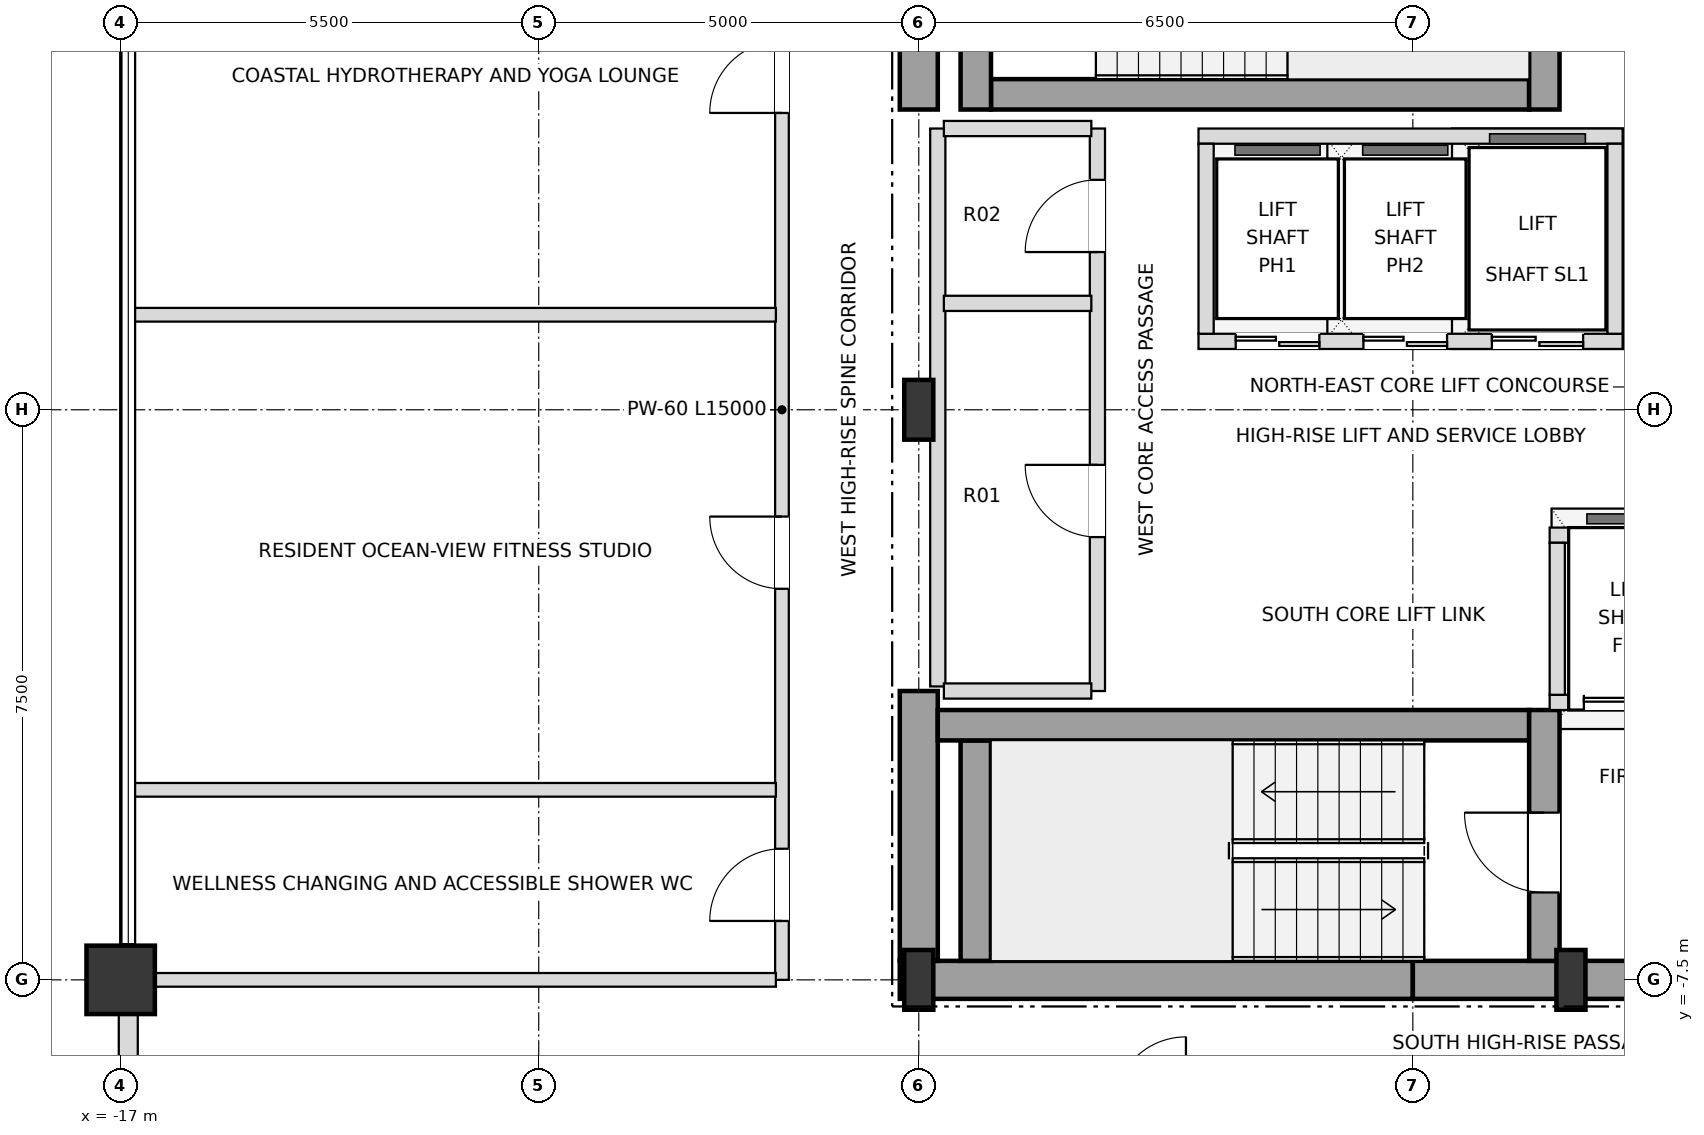
"""IFC4 building model, lengths in metres.
Left out: names, types, materials, properties, quantities, classifications, styles, units other than length and angle.
Written with IfcOpenShell. Run it as: python <this file> out.ifc"""

import sys

from ifc_helpers import new_model, si_unit, direction, frame, frame_2d, origin, origin_2d, place, context, subcontext, project, spatial, rectangle, i_section, extrude, element, fill, save


model = new_model("IFC4")
c1 = context("Model", 3, precision=1e-05, world=origin(), true_north=direction((0.0, 1.0)))
c2 = subcontext(c1, "Body", "Model", "MODEL_VIEW")
j1 = project(units=[si_unit("LENGTHUNIT", "METRE"), si_unit("PLANEANGLEUNIT", "RADIAN")], contexts=[c1])
p1 = place(None, origin())
s1 = spatial("IfcSite", under=j1, at=p1, CompositionType="ELEMENT")
p2 = place(p1, origin())
s2 = spatial("IfcBuilding", under=s1, at=p2, CompositionType="ELEMENT")
p3 = place(p2, frame((0.0, 0.0, 276.3)))
s3 = spatial("IfcBuildingStorey", under=s2, at=p3, CompositionType="ELEMENT", Elevation=276.3)
for number, where, z_axis, x_axis in (
    (1, (-6.5, -7.5, 0.0), (0.0, 0.0, 1.0), (1.0, 0.0, 0.0)),
    (2, (2.08, -7.5, 0.0), (0.0, 0.0, 1.0), (1.0, 0.0, 0.0)),
    (3, (-6.5, 0.0, 0.0), (0.0, 0.0, 1.0), (1.0, 0.0, 0.0)),
):
    element("IfcColumn", number, at=place(p3, frame(where, z_axis=z_axis, x_axis=x_axis)), inside=s3, PredefinedType="COLUMN", context=c2, shape_type="SweptSolid", body=[
        extrude(i_section(OverallWidth=0.382, OverallDepth=0.786, WebThickness=0.02, FlangeThickness=0.033, at=origin_2d()), origin(), (0.0, 0.0, 1.0), 3.6),
    ])
p4 = place(p3, frame((-17.0, -7.5, 0.0), z_axis=(0.0, 0.0, 1.0), x_axis=(1.0, 0.0, 0.0)))
e4 = element("IfcColumn", 4, at=p4, inside=s3, PredefinedType="USERDEFINED", context=c2, shape_type="SweptSolid", body=[
    extrude(rectangle(XDim=0.9, YDim=0.9, at=origin_2d()), origin(), (0.0, 0.0, 1.0), 3.6),
])
p5 = place(p3, frame((-16.9, -7.945, 0.0), z_axis=(0.0, 0.0, 1.0), x_axis=(0.0, -1.0, 0.0)))
e5 = element("IfcWall", 5, at=p5, inside=s3, PredefinedType="SOLIDWALL", context=c2, shape_type="SweptSolid", body=[
    extrude(rectangle(XDim=4.61, YDim=0.25, at=frame_2d((2.305, 0.0))), origin(), (0.0, 0.0, 1.0), 2.748),
])
p6 = place(p5, frame((1.405, 0.0, 0.72)))
e6 = element("IfcOpeningElement", 6, at=p6, cuts=e5, PredefinedType="OPENING", context=c2, shape_type="SweptSolid", body=[
    extrude(rectangle(XDim=1.8, YDim=1.68, at=frame_2d((0.9, 0.84))), frame((0.0, 0.135, 0.0), z_axis=(0.0, -1.0, 0.0), x_axis=(1.0, 0.0, 0.0)), (0.0, 0.0, 1.0), 0.27),
])
for number, where, z_axis, x_axis in (
    (7, (-6.75, -7.5, 0.0), (0.0, 0.0, 1.0), (1.0, 0.0, 0.0)),
    (8, (0.0, -7.5, 0.0), (0.0, 0.0, 1.0), (1.0, 0.0, 0.0)),
):
    element("IfcWall", number, at=place(p3, frame(where, z_axis=z_axis, x_axis=x_axis)), inside=s3, PredefinedType="SHEAR", context=c2, shape_type="SweptSolid", body=[
        extrude(rectangle(XDim=6.75, YDim=0.5, at=frame_2d((3.375, 0.0))), origin(), (0.0, 0.0, 1.0), 3.38),
    ])
p7 = place(p3, frame((-6.5, -7.25, 0.0), z_axis=(0.0, 0.0, 1.0), x_axis=(0.0, 1.0, 0.0)))
e9 = element("IfcWall", 9, at=p7, inside=s3, PredefinedType="SHEAR", context=c2, shape_type="SweptSolid", body=[
    extrude(rectangle(XDim=3.55, YDim=0.5, at=frame_2d((1.775, 0.0))), origin(), (0.0, 0.0, 1.0), 3.38),
])
p8 = place(p3, frame((-6.5, 3.95, 0.0), z_axis=(0.0, 0.0, 1.0), x_axis=(0.0, 1.0, 0.0)))
e10 = element("IfcWall", 10, at=p8, inside=s3, PredefinedType="SHEAR", context=c2, shape_type="SweptSolid", body=[
    extrude(rectangle(XDim=3.3, YDim=0.5, at=frame_2d((1.65, 0.0))), origin(), (0.0, 0.0, 1.0), 3.38),
])
p9 = place(p3, frame((-5.75, -7.25, 0.0), z_axis=(0.0, 0.0, 1.0), x_axis=(0.0, 1.0, 0.0)))
e11 = element("IfcWall", 11, at=p9, inside=s3, PredefinedType="SHEAR", context=c2, shape_type="SweptSolid", body=[
    extrude(rectangle(XDim=2.9, YDim=0.4, at=frame_2d((1.45, 0.0))), origin(), (0.0, 0.0, 1.0), 3.38),
])
p10 = place(p3, frame((-6.25, -4.15, 0.0), z_axis=(0.0, 0.0, 1.0), x_axis=(1.0, 0.0, 0.0)))
e12 = element("IfcWall", 12, at=p10, inside=s3, PredefinedType="SHEAR", context=c2, shape_type="SweptSolid", body=[
    extrude(rectangle(XDim=7.78, YDim=0.4, at=frame_2d((3.89, 0.0))), origin(), (0.0, 0.0, 1.0), 3.38),
])
p11 = place(p3, frame((1.73, -7.25, 0.0), z_axis=(0.0, 0.0, 1.0), x_axis=(0.0, 1.0, 0.0)))
e13 = element("IfcWall", 13, at=p11, inside=s3, PredefinedType="SHEAR", context=c2, shape_type="SweptSolid", body=[
    extrude(rectangle(XDim=3.3, YDim=0.4, at=frame_2d((1.65, 0.0))), origin(), (0.0, 0.0, 1.0), 3.38),
])
p12 = place(p11, frame((0.9, 0.0, 0.0)))
e14 = element("IfcOpeningElement", 14, at=p12, cuts=e13, PredefinedType="OPENING", context=c2, shape_type="SweptSolid", body=[
    extrude(rectangle(XDim=1.05, YDim=2.15, at=frame_2d((0.525, 1.075))), frame((0.0, 0.21, 0.0), z_axis=(0.0, -1.0, 0.0), x_axis=(1.0, 0.0, 0.0)), (0.0, 0.0, 1.0), 0.42),
])
p13 = place(p3, frame((-5.55, 4.15, 0.0), z_axis=(0.0, 0.0, 1.0), x_axis=(1.0, 0.0, 0.0)))
e15 = element("IfcWall", 15, at=p13, inside=s3, PredefinedType="SHEAR", context=c2, shape_type="SweptSolid", body=[
    extrude(rectangle(XDim=7.08, YDim=0.4, at=frame_2d((3.54, 0.0))), origin(), (0.0, 0.0, 1.0), 3.38),
])
for number, where, z_axis, x_axis in (
    (16, (1.73, 3.95, 0.0), (0.0, 0.0, 1.0), (0.0, 1.0, 0.0)),
    (17, (-5.75, 3.95, 0.0), (0.0, 0.0, 1.0), (0.0, 1.0, 0.0)),
):
    element("IfcWall", number, at=place(p3, frame(where, z_axis=z_axis, x_axis=x_axis)), inside=s3, PredefinedType="SHEAR", context=c2, shape_type="SweptSolid", body=[
        extrude(rectangle(XDim=3.3, YDim=0.4, at=frame_2d((1.65, 0.0))), origin(), (0.0, 0.0, 1.0), 3.38),
    ])
p14 = place(p3, frame((-2.82, 0.9, 0.0), z_axis=(0.0, 0.0, 1.0), x_axis=(1.0, 0.0, 0.0)))
e18 = element("IfcWall", 18, at=p14, inside=s3, PredefinedType="SOLIDWALL", context=c2, shape_type="SweptSolid", body=[
    extrude(rectangle(XDim=5.58, YDim=0.2, at=frame_2d((2.79, 0.0))), origin(), (0.0, 0.0, 1.0), 3.38),
])
p15 = place(p14, frame((0.49, 0.0, 0.0)))
e19 = element("IfcOpeningElement", 19, at=p15, cuts=e18, PredefinedType="OPENING", context=c2, shape_type="SweptSolid", body=[
    extrude(rectangle(XDim=1.1, YDim=2.15, at=frame_2d((0.55, 1.075))), frame((0.0, 0.11, 0.0), z_axis=(0.0, -1.0, 0.0), x_axis=(1.0, 0.0, 0.0)), (0.0, 0.0, 1.0), 0.22),
])
p16 = place(p14, frame((2.17, 0.0, 0.0)))
e20 = element("IfcOpeningElement", 20, at=p16, cuts=e18, PredefinedType="OPENING", context=c2, shape_type="SweptSolid", body=[
    extrude(rectangle(XDim=1.1, YDim=2.15, at=frame_2d((0.55, 1.075))), frame((0.0, 0.11, 0.0), z_axis=(0.0, -1.0, 0.0), x_axis=(1.0, 0.0, 0.0)), (0.0, 0.0, 1.0), 0.22),
])
p17 = place(p14, frame((3.86, 0.0, 0.0)))
e21 = element("IfcOpeningElement", 21, at=p17, cuts=e18, PredefinedType="OPENING", context=c2, shape_type="SweptSolid", body=[
    extrude(rectangle(XDim=1.2, YDim=2.2, at=frame_2d((0.6, 1.1))), frame((0.0, 0.11, 0.0), z_axis=(0.0, -1.0, 0.0), x_axis=(1.0, 0.0, 0.0)), (0.0, 0.0, 1.0), 0.22),
])
p18 = place(p3, frame((-2.82, 3.6, 0.0), z_axis=(0.0, 0.0, 1.0), x_axis=(1.0, 0.0, 0.0)))
e22 = element("IfcWall", 22, at=p18, inside=s3, PredefinedType="SOLIDWALL", context=c2, shape_type="SweptSolid", body=[
    extrude(rectangle(XDim=5.58, YDim=0.2, at=frame_2d((2.79, 0.0))), origin(), (0.0, 0.0, 1.0), 3.38),
])
for number, where, z_axis, x_axis in (
    (23, (-2.72, 1.0, 0.0), (0.0, 0.0, 1.0), (0.0, 1.0, 0.0)),
    (24, (2.66, 1.0, 0.0), (0.0, 0.0, 1.0), (0.0, 1.0, 0.0)),
):
    element("IfcWall", number, at=place(p3, frame(where, z_axis=z_axis, x_axis=x_axis)), inside=s3, PredefinedType="SOLIDWALL", context=c2, shape_type="SweptSolid", body=[
        extrude(rectangle(XDim=2.5, YDim=0.2, at=frame_2d((1.25, 0.0))), origin(), (0.0, 0.0, 1.0), 3.38),
    ])
p19 = place(p3, frame((1.8, -3.85, 0.0), z_axis=(0.0, 0.0, 1.0), x_axis=(1.0, 0.0, 0.0)))
e25 = element("IfcWall", 25, at=p19, inside=s3, PredefinedType="SOLIDWALL", context=c2, shape_type="SweptSolid", body=[
    extrude(rectangle(XDim=4.1, YDim=0.2, at=frame_2d((2.05, 0.0))), origin(), (0.0, 0.0, 1.0), 3.38),
])
p20 = place(p19, frame((0.45, 0.0, 0.0)))
e26 = element("IfcOpeningElement", 26, at=p20, cuts=e25, PredefinedType="OPENING", context=c2, shape_type="SweptSolid", body=[
    extrude(rectangle(XDim=1.2, YDim=2.2, at=frame_2d((0.6, 1.1))), frame((0.0, 0.11, 0.0), z_axis=(0.0, -1.0, 0.0), x_axis=(1.0, 0.0, 0.0)), (0.0, 0.0, 1.0), 0.22),
])
p21 = place(p19, frame((2.45, 0.0, 0.0)))
e27 = element("IfcOpeningElement", 27, at=p21, cuts=e25, PredefinedType="OPENING", context=c2, shape_type="SweptSolid", body=[
    extrude(rectangle(XDim=1.2, YDim=2.2, at=frame_2d((0.6, 1.1))), frame((0.0, 0.11, 0.0), z_axis=(0.0, -1.0, 0.0), x_axis=(1.0, 0.0, 0.0)), (0.0, 0.0, 1.0), 0.22),
])
p22 = place(p3, frame((1.8, -1.65, 0.0), z_axis=(0.0, 0.0, 1.0), x_axis=(1.0, 0.0, 0.0)))
e28 = element("IfcWall", 28, at=p22, inside=s3, PredefinedType="SOLIDWALL", context=c2, shape_type="SweptSolid", body=[
    extrude(rectangle(XDim=4.1, YDim=0.2, at=frame_2d((2.05, 0.0))), origin(), (0.0, 0.0, 1.0), 3.38),
])
p23 = place(p3, frame((1.9, -3.75, 0.0), z_axis=(0.0, 0.0, 1.0), x_axis=(0.0, 1.0, 0.0)))
e29 = element("IfcWall", 29, at=p23, inside=s3, PredefinedType="SOLIDWALL", context=c2, shape_type="SweptSolid", body=[
    extrude(rectangle(XDim=2.0, YDim=0.2, at=frame_2d((1.0, 0.0))), origin(), (0.0, 0.0, 1.0), 3.38),
])
p24 = place(p3, frame((-8.3, -7.5, 0.0), z_axis=(0.0, 0.0, 1.0), x_axis=(0.0, 1.0, 0.0)))
e30 = element("IfcWall", 30, at=p24, inside=s3, PredefinedType="PARTITIONING", context=c2, shape_type="SweptSolid", body=[
    extrude(rectangle(XDim=15.0, YDim=0.18, at=frame_2d((7.5, 0.0))), origin(), (0.0, 0.0, 1.0), 3.38),
])
p25 = place(p24, frame((0.775, 0.0, 0.0)))
e31 = element("IfcOpeningElement", 31, at=p25, cuts=e30, PredefinedType="OPENING", context=c2, shape_type="SweptSolid", body=[
    extrude(rectangle(XDim=0.95, YDim=2.15, at=frame_2d((0.475, 1.075))), frame((0.0, 0.1, 0.0), z_axis=(0.0, -1.0, 0.0), x_axis=(1.0, 0.0, 0.0)), (0.0, 0.0, 1.0), 0.2),
])
p26 = place(p24, frame((5.145, 0.0, 0.0)))
e32 = element("IfcOpeningElement", 32, at=p26, cuts=e30, PredefinedType="OPENING", context=c2, shape_type="SweptSolid", body=[
    extrude(rectangle(XDim=0.95, YDim=2.15, at=frame_2d((0.475, 1.075))), frame((0.0, 0.1, 0.0), z_axis=(0.0, -1.0, 0.0), x_axis=(1.0, 0.0, 0.0)), (0.0, 0.0, 1.0), 0.2),
])
p27 = place(p24, frame((11.405, 0.0, 0.0)))
e33 = element("IfcOpeningElement", 33, at=p27, cuts=e30, PredefinedType="OPENING", context=c2, shape_type="SweptSolid", body=[
    extrude(rectangle(XDim=0.95, YDim=2.15, at=frame_2d((0.475, 1.075))), frame((0.0, 0.1, 0.0), z_axis=(0.0, -1.0, 0.0), x_axis=(1.0, 0.0, 0.0)), (0.0, 0.0, 1.0), 0.2),
])
p28 = place(p3, frame((-6.25, -3.64, 0.0), z_axis=(0.0, 0.0, 1.0), x_axis=(0.0, 1.0, 0.0)))
e34 = element("IfcWall", 34, at=p28, inside=s3, PredefinedType="SOLIDWALL", context=c2, shape_type="SweptSolid", body=[
    extrude(rectangle(XDim=7.34, YDim=0.2, at=frame_2d((3.67, 0.0))), origin(), (0.0, 0.0, 1.0), 3.38),
])
p29 = place(p3, frame((-4.15, -3.7, 0.0), z_axis=(0.0, 0.0, 1.0), x_axis=(0.0, 1.0, 0.0)))
e35 = element("IfcWall", 35, at=p29, inside=s3, PredefinedType="SOLIDWALL", context=c2, shape_type="SweptSolid", body=[
    extrude(rectangle(XDim=7.4, YDim=0.2, at=frame_2d((3.7, 0.0))), origin(), (0.0, 0.0, 1.0), 3.38),
])
p30 = place(p29, frame((2.025, 0.0, 0.0)))
e36 = element("IfcOpeningElement", 36, at=p30, cuts=e35, PredefinedType="OPENING", context=c2, shape_type="SweptSolid", body=[
    extrude(rectangle(XDim=0.95, YDim=2.15, at=frame_2d((0.475, 1.075))), frame((0.0, 0.11, 0.0), z_axis=(0.0, -1.0, 0.0), x_axis=(1.0, 0.0, 0.0)), (0.0, 0.0, 1.0), 0.22),
])
p31 = place(p29, frame((5.775, 0.0, 0.0)))
e37 = element("IfcOpeningElement", 37, at=p31, cuts=e35, PredefinedType="OPENING", context=c2, shape_type="SweptSolid", body=[
    extrude(rectangle(XDim=0.95, YDim=2.15, at=frame_2d((0.475, 1.075))), frame((0.0, 0.11, 0.0), z_axis=(0.0, -1.0, 0.0), x_axis=(1.0, 0.0, 0.0)), (0.0, 0.0, 1.0), 0.22),
])
p32 = place(p3, frame((-16.9, -7.5, 0.0), z_axis=(0.0, 0.0, 1.0), x_axis=(1.0, 0.0, 0.0)))
e38 = element("IfcWall", 38, at=p32, inside=s3, PredefinedType="PARTITIONING", context=c2, shape_type="SweptSolid", body=[
    extrude(rectangle(XDim=8.52, YDim=0.18, at=frame_2d((4.26, 0.0))), origin(), (0.0, 0.0, 1.0), 2.826),
])
p33 = place(p3, frame((-16.82, -5.0, 0.0), z_axis=(0.0, 0.0, 1.0), x_axis=(1.0, 0.0, 0.0)))
e39 = element("IfcWall", 39, at=p33, inside=s3, PredefinedType="PARTITIONING", context=c2, shape_type="SweptSolid", body=[
    extrude(rectangle(XDim=8.44, YDim=0.18, at=frame_2d((4.22, 0.0))), origin(), (0.0, 0.0, 1.0), 3.018),
])
p34 = place(p3, frame((-6.17, -3.7, 0.0), z_axis=(0.0, 0.0, 1.0), x_axis=(1.0, 0.0, 0.0)))
e40 = element("IfcWall", 40, at=p34, inside=s3, PredefinedType="SOLIDWALL", context=c2, shape_type="SweptSolid", body=[
    extrude(rectangle(XDim=1.94, YDim=0.2, at=frame_2d((0.97, 0.0))), origin(), (0.0, 0.0, 1.0), 3.38),
])
p35 = place(p3, frame((-16.82, 1.25, 0.0), z_axis=(0.0, 0.0, 1.0), x_axis=(1.0, 0.0, 0.0)))
e41 = element("IfcWall", 41, at=p35, inside=s3, PredefinedType="PARTITIONING", context=c2, shape_type="SweptSolid", body=[
    extrude(rectangle(XDim=8.44, YDim=0.18, at=frame_2d((4.22, 0.0))), origin(), (0.0, 0.0, 1.0), 3.018),
])
for number, where, z_axis, x_axis in (
    (42, (-6.17, 1.4, 0.0), (0.0, 0.0, 1.0), (1.0, 0.0, 0.0)),
    (43, (-6.17, 3.7, 0.0), (0.0, 0.0, 1.0), (1.0, 0.0, 0.0)),
):
    element("IfcWall", number, at=place(p3, frame(where, z_axis=z_axis, x_axis=x_axis)), inside=s3, PredefinedType="SOLIDWALL", context=c2, shape_type="SweptSolid", body=[
        extrude(rectangle(XDim=1.94, YDim=0.2, at=frame_2d((0.97, 0.0))), origin(), (0.0, 0.0, 1.0), 3.38),
    ])
p36 = place(p12, origin())
e44 = element("IfcDoor", 44, at=p36, inside=s3, OperationType="SINGLE_SWING_RIGHT", PredefinedType="DOOR", context=c2, shape_type="SweptSolid", body=[
    extrude(rectangle(XDim=1.05, YDim=2.15, at=frame_2d((0.525, 1.075))), frame((0.0, 0.025, 0.0), z_axis=(0.0, -1.0, 0.0), x_axis=(1.0, 0.0, 0.0)), (0.0, 0.0, 1.0), 0.05),
])
fill(e14, e44)
p37 = place(p15, origin())
e45 = element("IfcDoor", 45, at=p37, inside=s3, OperationType="DOUBLE_DOOR_SLIDING", PredefinedType="DOOR", context=c2, shape_type="SweptSolid", body=[
    extrude(rectangle(XDim=1.1, YDim=2.15, at=frame_2d((0.55, 1.075))), frame((0.0, 0.025, 0.0), z_axis=(0.0, -1.0, 0.0), x_axis=(1.0, 0.0, 0.0)), (0.0, 0.0, 1.0), 0.05),
])
fill(e19, e45)
p38 = place(p16, origin())
e46 = element("IfcDoor", 46, at=p38, inside=s3, OperationType="DOUBLE_DOOR_SLIDING", PredefinedType="DOOR", context=c2, shape_type="SweptSolid", body=[
    extrude(rectangle(XDim=1.1, YDim=2.15, at=frame_2d((0.55, 1.075))), frame((0.0, 0.025, 0.0), z_axis=(0.0, -1.0, 0.0), x_axis=(1.0, 0.0, 0.0)), (0.0, 0.0, 1.0), 0.05),
])
fill(e20, e46)
p39 = place(p17, origin())
e47 = element("IfcDoor", 47, at=p39, inside=s3, OperationType="DOUBLE_DOOR_SLIDING", PredefinedType="DOOR", context=c2, shape_type="SweptSolid", body=[
    extrude(rectangle(XDim=1.2, YDim=2.2, at=frame_2d((0.6, 1.1))), frame((0.0, 0.025, 0.0), z_axis=(0.0, -1.0, 0.0), x_axis=(1.0, 0.0, 0.0)), (0.0, 0.0, 1.0), 0.05),
])
fill(e21, e47)
p40 = place(p20, origin())
e48 = element("IfcDoor", 48, at=p40, inside=s3, OperationType="DOUBLE_DOOR_SLIDING", PredefinedType="DOOR", context=c2, shape_type="SweptSolid", body=[
    extrude(rectangle(XDim=1.2, YDim=2.2, at=frame_2d((0.6, 1.1))), frame((0.0, 0.025, 0.0), z_axis=(0.0, -1.0, 0.0), x_axis=(1.0, 0.0, 0.0)), (0.0, 0.0, 1.0), 0.05),
])
fill(e26, e48)
p41 = place(p30, origin())
e49 = element("IfcDoor", 49, at=p41, inside=s3, OperationType="SINGLE_SWING_RIGHT", PredefinedType="DOOR", context=c2, shape_type="SweptSolid", body=[
    extrude(rectangle(XDim=0.95, YDim=2.15, at=frame_2d((0.475, 1.075))), frame((0.0, 0.025, 0.0), z_axis=(0.0, -1.0, 0.0), x_axis=(1.0, 0.0, 0.0)), (0.0, 0.0, 1.0), 0.05),
])
fill(e36, e49)
p42 = place(p31, origin())
e50 = element("IfcDoor", 50, at=p42, inside=s3, OperationType="SINGLE_SWING_LEFT", PredefinedType="DOOR", context=c2, shape_type="SweptSolid", body=[
    extrude(rectangle(XDim=0.95, YDim=2.15, at=frame_2d((0.475, 1.075))), frame((0.0, 0.025, 0.0), z_axis=(0.0, -1.0, 0.0), x_axis=(1.0, 0.0, 0.0)), (0.0, 0.0, 1.0), 0.05),
])
fill(e37, e50)
p43 = place(p25, origin())
e51 = element("IfcDoor", 51, at=p43, inside=s3, OperationType="SINGLE_SWING_LEFT", PredefinedType="DOOR", context=c2, shape_type="SweptSolid", body=[
    extrude(rectangle(XDim=0.95, YDim=2.15, at=frame_2d((0.475, 1.075))), frame((0.0, 0.025, 0.0), z_axis=(0.0, -1.0, 0.0), x_axis=(1.0, 0.0, 0.0)), (0.0, 0.0, 1.0), 0.05),
])
fill(e31, e51)
p44 = place(p26, origin())
e52 = element("IfcDoor", 52, at=p44, inside=s3, OperationType="SINGLE_SWING_RIGHT", PredefinedType="DOOR", context=c2, shape_type="SweptSolid", body=[
    extrude(rectangle(XDim=0.95, YDim=2.15, at=frame_2d((0.475, 1.075))), frame((0.0, 0.025, 0.0), z_axis=(0.0, -1.0, 0.0), x_axis=(1.0, 0.0, 0.0)), (0.0, 0.0, 1.0), 0.05),
])
fill(e32, e52)
p45 = place(p27, origin())
e53 = element("IfcDoor", 53, at=p45, inside=s3, OperationType="SINGLE_SWING_LEFT", PredefinedType="DOOR", context=c2, shape_type="SweptSolid", body=[
    extrude(rectangle(XDim=0.95, YDim=2.15, at=frame_2d((0.475, 1.075))), frame((0.0, 0.025, 0.0), z_axis=(0.0, -1.0, 0.0), x_axis=(1.0, 0.0, 0.0)), (0.0, 0.0, 1.0), 0.05),
])
fill(e33, e53)
save(model, sys.argv[1])
